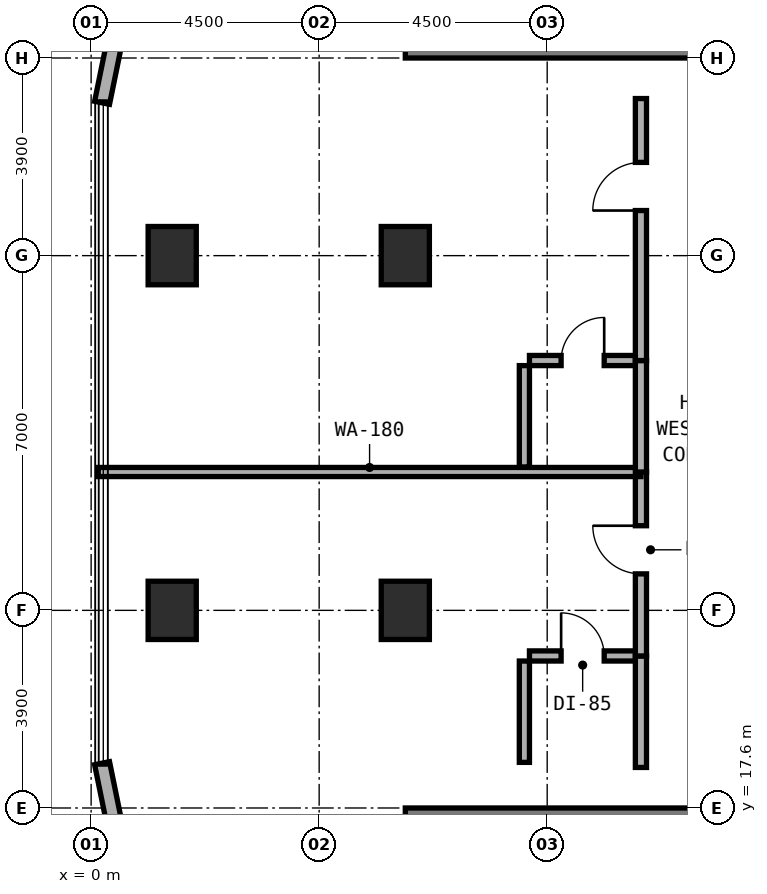
"""IFC4 building model, lengths in metres.
Left out: names, types, materials, properties, quantities, classifications, styles, units other than length and angle.
Written with IfcOpenShell. Run it as: python <this file> out.ifc"""

import sys

from ifc_helpers import new_model, si_unit, direction, frame, frame_2d, origin, origin_2d, place, context, subcontext, project, spatial, rectangle, extrude, element, fill, save


model = new_model("IFC4")
c1 = context("Model", 3, precision=1e-05, world=origin(), true_north=direction((0.0, 1.0)))
c2 = subcontext(c1, "Body", "Model", "MODEL_VIEW")
j1 = project(units=[si_unit("LENGTHUNIT", "METRE"), si_unit("PLANEANGLEUNIT", "RADIAN")], contexts=[c1])
p1 = place(None, origin())
s1 = spatial("IfcSite", under=j1, at=p1, CompositionType="ELEMENT")
p2 = place(p1, origin())
s2 = spatial("IfcBuilding", under=s1, at=p2, CompositionType="ELEMENT")
p3 = place(p2, frame((0.0, 0.0, 52.0)))
s3 = spatial("IfcBuildingStorey", under=s2, at=p3, CompositionType="ELEMENT", Elevation=52.0)
p4 = place(p3, frame((6.2, 32.7, 0.0), z_axis=(0.0, 0.0, 1.0), x_axis=(1.0, 0.0, 0.0)))
e1 = element("IfcWall", 1, at=p4, inside=s3, PredefinedType="SHEAR", context=c2, shape_type="SweptSolid", body=[
    extrude(rectangle(XDim=24.8, YDim=0.6, at=frame_2d((12.4, 0.0))), origin(), (0.0, 0.0, 1.0), 3.5),
])
p5 = place(p4, frame((6.25, 0.0, 0.0)))
e2 = element("IfcOpeningElement", 2, at=p5, cuts=e1, PredefinedType="OPENING", context=c2, shape_type="SweptSolid", body=[
    extrude(rectangle(XDim=1.1, YDim=2.15, at=frame_2d((0.55, 1.075))), frame((0.0, 0.31, 0.0), z_axis=(0.0, -1.0, 0.0), x_axis=(1.0, 0.0, 0.0)), (0.0, 0.0, 1.0), 0.62),
])
p6 = place(p3, frame((6.2, 17.3, 0.0), z_axis=(0.0, 0.0, 1.0), x_axis=(1.0, 0.0, 0.0)))
e3 = element("IfcWall", 3, at=p6, inside=s3, PredefinedType="SHEAR", context=c2, shape_type="SweptSolid", body=[
    extrude(rectangle(XDim=24.8, YDim=0.6, at=frame_2d((12.4, 0.0))), origin(), (0.0, 0.0, 1.0), 3.5),
])
for number, where, z_axis, x_axis in (
    (4, (6.2, 21.5, 0.0), (0.0, 0.0, 1.0), (1.0, 0.0, 0.0)),
    (5, (6.2, 28.5, 0.0), (0.0, 0.0, 1.0), (1.0, 0.0, 0.0)),
    (6, (1.6, 21.5, 0.0), (0.0, 0.0, 1.0), (1.0, 0.0, 0.0)),
    (7, (1.6, 28.5, 0.0), (0.0, 0.0, 1.0), (1.0, 0.0, 0.0)),
):
    element("IfcColumn", number, at=place(p3, frame(where, z_axis=z_axis, x_axis=x_axis)), inside=s3, PredefinedType="COLUMN", context=c2, shape_type="SweptSolid", body=[
        extrude(rectangle(XDim=0.95, YDim=1.15, at=origin_2d()), origin(), (0.0, 0.0, 1.0), 3.5),
    ])
p7 = place(p3, frame((2.229, 41.378, 0.0), z_axis=(0.0, 0.0, 1.0), x_axis=(-0.199990901713, -0.979797754249, 0.0)))
e8 = element("IfcWall", 8, at=p7, inside=s3, PredefinedType="STANDARD", context=c2, shape_type="SweptSolid", body=[
    extrude(rectangle(XDim=10.065, YDim=0.3, at=frame_2d((5.033, 0.0))), origin(), (0.0, 0.0, 1.0), 3.22),
])
p8 = place(p7, frame((0.378, 0.0, 0.85)))
e9 = element("IfcOpeningElement", 9, at=p8, cuts=e8, PredefinedType="OPENING", context=c2, shape_type="SweptSolid", body=[
    extrude(rectangle(XDim=1.8, YDim=1.5, at=frame_2d((0.9, 0.75))), frame((0.0, 0.16, 0.0), z_axis=(0.0, -1.0, 0.0), x_axis=(1.0, 0.0, 0.0)), (0.0, 0.0, 1.0), 0.32),
])
p9 = place(p7, frame((5.236, 0.0, 0.8)))
e10 = element("IfcOpeningElement", 10, at=p9, cuts=e8, PredefinedType="OPENING", context=c2, shape_type="SweptSolid", body=[
    extrude(rectangle(XDim=2.4, YDim=1.6, at=frame_2d((1.2, 0.8))), frame((0.0, 0.16, 0.0), z_axis=(0.0, -1.0, 0.0), x_axis=(1.0, 0.0, 0.0)), (0.0, 0.0, 1.0), 0.32),
])
p10 = place(p3, frame((0.216, 18.484, 0.0), z_axis=(0.0, 0.0, 1.0), x_axis=(0.199990901713, -0.979797754249, 0.0)))
e11 = element("IfcWall", 11, at=p10, inside=s3, PredefinedType="STANDARD", context=c2, shape_type="SweptSolid", body=[
    extrude(rectangle(XDim=10.065, YDim=0.3, at=frame_2d((5.033, 0.0))), origin(), (0.0, 0.0, 1.0), 3.22),
])
p11 = place(p10, frame((2.429, 0.0, 0.8)))
e12 = element("IfcOpeningElement", 12, at=p11, cuts=e11, PredefinedType="OPENING", context=c2, shape_type="SweptSolid", body=[
    extrude(rectangle(XDim=2.4, YDim=1.6, at=frame_2d((1.2, 0.8))), frame((0.0, 0.16, 0.0), z_axis=(0.0, -1.0, 0.0), x_axis=(1.0, 0.0, 0.0)), (0.0, 0.0, 1.0), 0.32),
])
p12 = place(p10, frame((7.887, 0.0, 0.85)))
e13 = element("IfcOpeningElement", 13, at=p12, cuts=e11, PredefinedType="OPENING", context=c2, shape_type="SweptSolid", body=[
    extrude(rectangle(XDim=1.8, YDim=1.5, at=frame_2d((0.9, 0.75))), frame((0.0, 0.16, 0.0), z_axis=(0.0, -1.0, 0.0), x_axis=(1.0, 0.0, 0.0)), (0.0, 0.0, 1.0), 0.32),
])
p13 = place(p3, frame((8.65, 20.6, 0.0), z_axis=(0.0, 0.0, 1.0), x_axis=(1.0, 0.0, 0.0)))
e14 = element("IfcWall", 14, at=p13, inside=s3, PredefinedType="PLUMBINGWALL", context=c2, shape_type="SweptSolid", body=[
    extrude(rectangle(XDim=2.1, YDim=0.2, at=frame_2d((1.05, 0.0))), origin(), (0.0, 0.0, 1.0), 3.22),
])
p14 = place(p13, frame((0.625, 0.0, 0.0)))
e15 = element("IfcOpeningElement", 15, at=p14, cuts=e14, PredefinedType="OPENING", context=c2, shape_type="SweptSolid", body=[
    extrude(rectangle(XDim=0.85, YDim=2.1, at=frame_2d((0.425, 1.05))), frame((0.0, 0.11, 0.0), z_axis=(0.0, -1.0, 0.0), x_axis=(1.0, 0.0, 0.0)), (0.0, 0.0, 1.0), 0.22),
])
p15 = place(p3, frame((8.55, 18.5, 0.0), z_axis=(0.0, 0.0, 1.0), x_axis=(0.0, 1.0, 0.0)))
e16 = element("IfcWall", 16, at=p15, inside=s3, PredefinedType="PLUMBINGWALL", context=c2, shape_type="SweptSolid", body=[
    extrude(rectangle(XDim=2.0, YDim=0.2, at=frame_2d((1.0, 0.0))), origin(), (0.0, 0.0, 1.0), 3.22),
])
p16 = place(p3, frame((10.85, 18.4, 0.0), z_axis=(0.0, 0.0, 1.0), x_axis=(0.0, 1.0, 0.0)))
e17 = element("IfcWall", 17, at=p16, inside=s3, PredefinedType="SOLIDWALL", context=c2, shape_type="SweptSolid", body=[
    extrude(rectangle(XDim=2.2, YDim=0.22, at=frame_2d((1.1, 0.0))), origin(), (0.0, 0.0, 1.0), 3.22),
])
p17 = place(p3, frame((10.85, 20.6, 0.0), z_axis=(0.0, 0.0, 1.0), x_axis=(0.0, 1.0, 0.0)))
e18 = element("IfcWall", 18, at=p17, inside=s3, PredefinedType="SOLIDWALL", context=c2, shape_type="SweptSolid", body=[
    extrude(rectangle(XDim=3.63, YDim=0.22, at=frame_2d((1.815, 0.0))), origin(), (0.0, 0.0, 1.0), 2.395),
])
p18 = place(p17, frame((1.62, 0.0, 0.0)))
e19 = element("IfcOpeningElement", 19, at=p18, cuts=e18, PredefinedType="OPENING", context=c2, shape_type="SweptSolid", body=[
    extrude(rectangle(XDim=0.95, YDim=2.1, at=frame_2d((0.475, 1.05))), frame((0.0, 0.12, 0.0), z_axis=(0.0, -1.0, 0.0), x_axis=(1.0, 0.0, 0.0)), (0.0, 0.0, 1.0), 0.24),
])
p19 = place(p3, frame((0.14, 24.23, 0.0), z_axis=(0.0, 0.0, 1.0), x_axis=(1.0, 0.0, 0.0)))
e20 = element("IfcWall", 20, at=p19, inside=s3, PredefinedType="SOLIDWALL", context=c2, shape_type="SweptSolid", body=[
    extrude(rectangle(XDim=10.71, YDim=0.18, at=frame_2d((5.355, 0.0))), origin(), (0.0, 0.0, 1.0), 2.745),
])
p20 = place(p3, frame((8.65, 26.43, 0.0), z_axis=(0.0, 0.0, 1.0), x_axis=(1.0, 0.0, 0.0)))
e21 = element("IfcWall", 21, at=p20, inside=s3, PredefinedType="PLUMBINGWALL", context=c2, shape_type="SweptSolid", body=[
    extrude(rectangle(XDim=2.1, YDim=0.2, at=frame_2d((1.05, 0.0))), origin(), (0.0, 0.0, 1.0), 3.22),
])
p21 = place(p20, frame((0.625, 0.0, 0.0)))
e22 = element("IfcOpeningElement", 22, at=p21, cuts=e21, PredefinedType="OPENING", context=c2, shape_type="SweptSolid", body=[
    extrude(rectangle(XDim=0.85, YDim=2.1, at=frame_2d((0.425, 1.05))), frame((0.0, 0.11, 0.0), z_axis=(0.0, -1.0, 0.0), x_axis=(1.0, 0.0, 0.0)), (0.0, 0.0, 1.0), 0.22),
])
p22 = place(p3, frame((8.55, 24.33, 0.0), z_axis=(0.0, 0.0, 1.0), x_axis=(0.0, 1.0, 0.0)))
e23 = element("IfcWall", 23, at=p22, inside=s3, PredefinedType="PLUMBINGWALL", context=c2, shape_type="SweptSolid", body=[
    extrude(rectangle(XDim=2.0, YDim=0.2, at=frame_2d((1.0, 0.0))), origin(), (0.0, 0.0, 1.0), 3.22),
])
p23 = place(p3, frame((10.85, 24.23, 0.0), z_axis=(0.0, 0.0, 1.0), x_axis=(0.0, 1.0, 0.0)))
e24 = element("IfcWall", 24, at=p23, inside=s3, PredefinedType="SOLIDWALL", context=c2, shape_type="SweptSolid", body=[
    extrude(rectangle(XDim=2.2, YDim=0.22, at=frame_2d((1.1, 0.0))), origin(), (0.0, 0.0, 1.0), 3.22),
])
p24 = place(p3, frame((10.85, 26.43, 0.0), z_axis=(0.0, 0.0, 1.0), x_axis=(0.0, 1.0, 0.0)))
e25 = element("IfcWall", 25, at=p24, inside=s3, PredefinedType="SOLIDWALL", context=c2, shape_type="SweptSolid", body=[
    extrude(rectangle(XDim=5.17, YDim=0.22, at=frame_2d((2.585, 0.0))), origin(), (0.0, 0.0, 1.0), 2.395),
])
p25 = place(p24, frame((2.96, 0.0, 0.0)))
e26 = element("IfcOpeningElement", 26, at=p25, cuts=e25, PredefinedType="OPENING", context=c2, shape_type="SweptSolid", body=[
    extrude(rectangle(XDim=0.95, YDim=2.1, at=frame_2d((0.475, 1.05))), frame((0.0, 0.12, 0.0), z_axis=(0.0, -1.0, 0.0), x_axis=(1.0, 0.0, 0.0)), (0.0, 0.0, 1.0), 0.24),
])
p26 = place(p14, origin())
e27 = element("IfcDoor", 27, at=p26, inside=s3, OperationType="SINGLE_SWING_LEFT", PredefinedType="DOOR", context=c2, shape_type="SweptSolid", body=[
    extrude(rectangle(XDim=0.85, YDim=2.1, at=frame_2d((0.425, 1.05))), frame((0.0, 0.025, 0.0), z_axis=(0.0, -1.0, 0.0), x_axis=(1.0, 0.0, 0.0)), (0.0, 0.0, 1.0), 0.05),
])
fill(e15, e27)
p27 = place(p18, origin())
e28 = element("IfcDoor", 28, at=p27, inside=s3, OperationType="SINGLE_SWING_RIGHT", PredefinedType="DOOR", context=c2, shape_type="SweptSolid", body=[
    extrude(rectangle(XDim=0.95, YDim=2.1, at=frame_2d((0.475, 1.05))), frame((0.0, 0.025, 0.0), z_axis=(0.0, -1.0, 0.0), x_axis=(1.0, 0.0, 0.0)), (0.0, 0.0, 1.0), 0.05),
])
fill(e19, e28)
p28 = place(p21, origin())
e29 = element("IfcDoor", 29, at=p28, inside=s3, OperationType="SINGLE_SWING_RIGHT", PredefinedType="DOOR", context=c2, shape_type="SweptSolid", body=[
    extrude(rectangle(XDim=0.85, YDim=2.1, at=frame_2d((0.425, 1.05))), frame((0.0, 0.025, 0.0), z_axis=(0.0, -1.0, 0.0), x_axis=(1.0, 0.0, 0.0)), (0.0, 0.0, 1.0), 0.05),
])
fill(e22, e29)
p29 = place(p25, origin())
e30 = element("IfcDoor", 30, at=p29, inside=s3, OperationType="SINGLE_SWING_LEFT", PredefinedType="DOOR", context=c2, shape_type="SweptSolid", body=[
    extrude(rectangle(XDim=0.95, YDim=2.1, at=frame_2d((0.475, 1.05))), frame((0.0, 0.025, 0.0), z_axis=(0.0, -1.0, 0.0), x_axis=(1.0, 0.0, 0.0)), (0.0, 0.0, 1.0), 0.05),
])
fill(e26, e30)
save(model, sys.argv[1])
